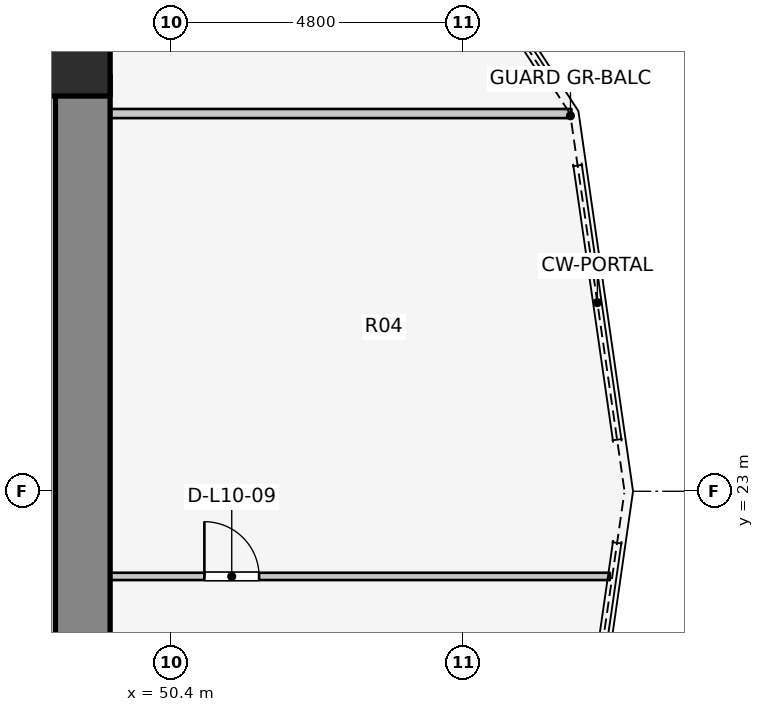
"""IFC4 building model, lengths in metres.
Left out: names, types, materials, properties, quantities, classifications, styles, units other than length and angle.
Written with IfcOpenShell. Run it as: python <this file> out.ifc"""

import sys

from ifc_helpers import new_model, si_unit, direction, frame, frame_2d, origin, origin_2d, place, context, subcontext, project, spatial, rectangle, extrude, element, fill, save


model = new_model("IFC4")
c1 = context("Model", 3, precision=1e-05, world=origin(), true_north=direction((0.0, 1.0)))
c2 = subcontext(c1, "Body", "Model", "MODEL_VIEW")
j1 = project(units=[si_unit("LENGTHUNIT", "METRE"), si_unit("PLANEANGLEUNIT", "RADIAN")], contexts=[c1])
p1 = place(None, origin())
s1 = spatial("IfcSite", under=j1, at=p1, CompositionType="ELEMENT")
p2 = place(p1, origin())
s2 = spatial("IfcBuilding", under=s1, at=p2, CompositionType="ELEMENT")
p3 = place(p2, frame((0.0, 0.0, 36.9)))
s3 = spatial("IfcBuildingStorey", under=s2, at=p3, CompositionType="ELEMENT", Elevation=36.9)
p4 = place(p3, frame((48.95, 17.05, 0.0), z_axis=(0.0, 0.0, 1.0), x_axis=(0.0, 1.0, 0.0)))
e1 = element("IfcWall", 1, at=p4, inside=s3, PredefinedType="SHEAR", context=c2, shape_type="SweptSolid", body=[
    extrude(rectangle(XDim=12.8, YDim=0.9, at=frame_2d((6.4, 0.0))), origin(), (0.0, 0.0, 1.0), 3.1),
])
p5 = place(p3, frame((48.7, 30.2, 0.0), z_axis=(0.0, 0.0, 1.0), x_axis=(1.0, 0.0, 0.0)))
e2 = element("IfcColumn", 2, at=p5, inside=s3, PredefinedType="COLUMN", context=c2, shape_type="SweptSolid", body=[
    extrude(rectangle(XDim=1.4, YDim=1.4, at=origin_2d()), origin(), (0.0, 0.0, 1.0), 3.1),
])
p6 = place(p3, frame((48.95, 29.212, 0.0), z_axis=(0.0, 0.0, 1.0), x_axis=(1.0, 0.0, 0.0)))
e3 = element("IfcWall", 3, at=p6, inside=s3, PredefinedType="PARTITIONING", context=c2, shape_type="SweptSolid", body=[
    extrude(rectangle(XDim=8.036, YDim=0.15, at=frame_2d((4.018, 0.0))), origin(), (0.0, 0.0, 1.0), 2.855),
])
p7 = place(p3, frame((48.95, 21.6, 0.0), z_axis=(0.0, 0.0, 1.0), x_axis=(1.0, 0.0, 0.0)))
e4 = element("IfcWall", 4, at=p7, inside=s3, PredefinedType="MOVABLE", context=c2, shape_type="SweptSolid", body=[
    extrude(rectangle(XDim=8.669, YDim=0.12, at=frame_2d((4.334, 0.0))), origin(), (0.0, 0.0, 1.0), 2.855),
])
p8 = place(p7, frame((2.0, 0.0, 0.0)))
e5 = element("IfcOpeningElement", 5, at=p8, cuts=e4, PredefinedType="OPENING", context=c2, shape_type="SweptSolid", body=[
    extrude(rectangle(XDim=0.9, YDim=2.1, at=frame_2d((0.45, 1.05))), frame((0.0, 0.07, 0.0), z_axis=(0.0, -1.0, 0.0), x_axis=(1.0, 0.0, 0.0)), (0.0, 0.0, 1.0), 0.14),
])
p9 = place(p3, frame((48.95, 29.8, 0.0), z_axis=(0.0, 0.0, 1.0), x_axis=(0.0, 1.0, 0.0)))
e6 = element("IfcWall", 6, at=p9, inside=s3, PredefinedType="PARTITIONING", context=c2, shape_type="SweptSolid", body=[
    extrude(rectangle(XDim=1.29, YDim=0.15, at=frame_2d((0.645, 0.0))), origin(), (0.0, 0.0, 1.0), 2.069),
])
p10 = place(p8, origin())
e7 = element("IfcDoor", 7, at=p10, inside=s3, OperationType="SINGLE_SWING_LEFT", PredefinedType="DOOR", context=c2, shape_type="SweptSolid", body=[
    extrude(rectangle(XDim=0.9, YDim=2.1, at=frame_2d((0.45, 1.05))), frame((0.0, 0.025, 0.0), z_axis=(0.0, -1.0, 0.0), x_axis=(1.0, 0.0, 0.0)), (0.0, 0.0, 1.0), 0.05),
])
fill(e5, e7)
save(model, sys.argv[1])
